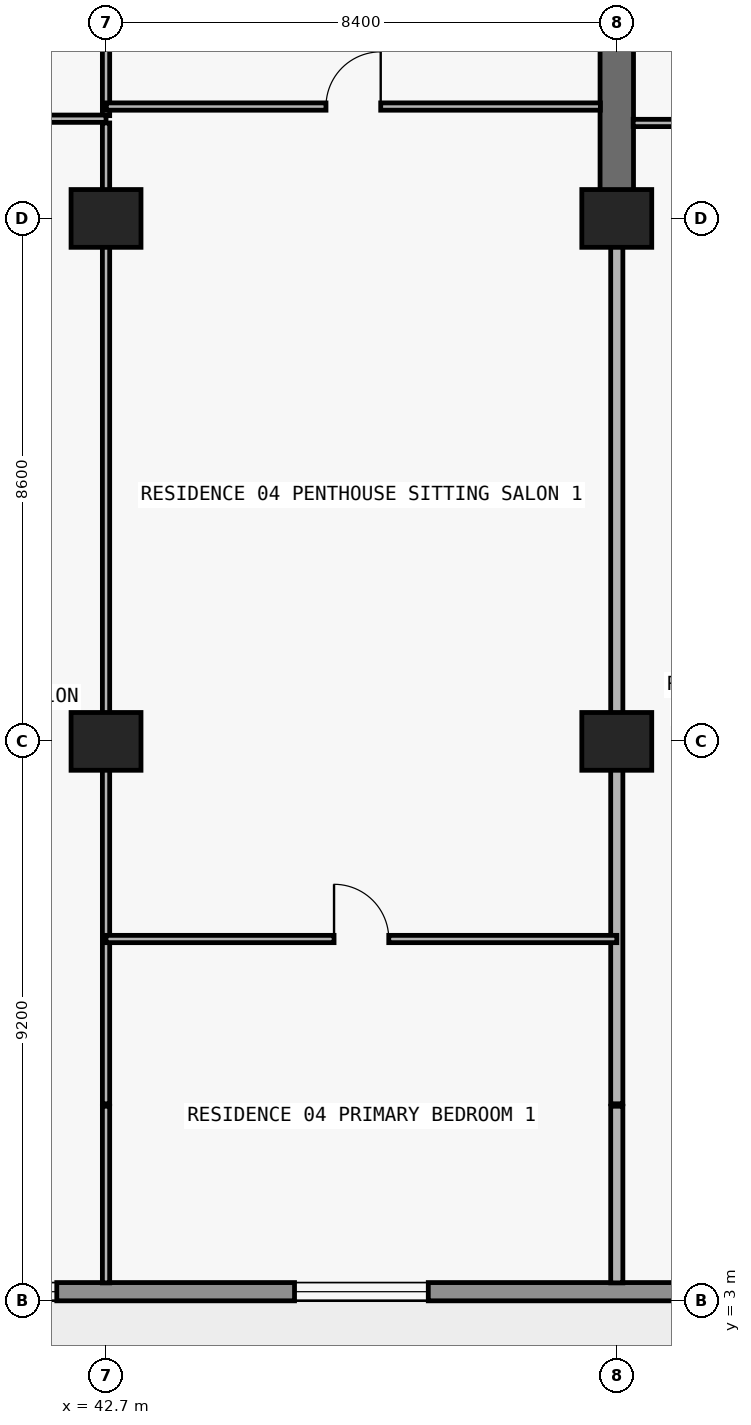
"""IFC4 building model, lengths in metres.
Left out: names, types, materials, properties, quantities, classifications, styles, units other than length and angle.
Written with IfcOpenShell. Run it as: python <this file> out.ifc"""

import sys

from ifc_helpers import new_model, si_unit, direction, frame, frame_2d, origin, origin_2d, place, context, subcontext, project, spatial, rectangle, extrude, element, fill, save


model = new_model("IFC4")
c1 = context("Model", 3, precision=1e-05, world=origin(), true_north=direction((0.0, 1.0)))
c2 = subcontext(c1, "Body", "Model", "MODEL_VIEW")
j1 = project(units=[si_unit("LENGTHUNIT", "METRE"), si_unit("PLANEANGLEUNIT", "RADIAN")], contexts=[c1])
p1 = place(None, origin())
s1 = spatial("IfcSite", under=j1, at=p1, CompositionType="ELEMENT")
p2 = place(p1, origin())
s2 = spatial("IfcBuilding", under=s1, at=p2, CompositionType="ELEMENT")
p3 = place(p2, frame((0.0, 0.0, 30.0)))
s3 = spatial("IfcBuildingStorey", under=s2, at=p3, CompositionType="ELEMENT", Elevation=30.0)
for number, where, z_axis, x_axis in (
    (1, (42.7, 12.2, 0.0), (0.0, 0.0, 1.0), (1.0, 0.0, 0.0)),
    (2, (51.1, 12.2, 0.0), (0.0, 0.0, 1.0), (1.0, 0.0, 0.0)),
    (3, (42.7, 20.8, 0.0), (0.0, 0.0, 1.0), (1.0, 0.0, 0.0)),
    (4, (51.1, 20.8, 0.0), (0.0, 0.0, 1.0), (1.0, 0.0, 0.0)),
):
    element("IfcColumn", number, at=place(p3, frame(where, z_axis=z_axis, x_axis=x_axis)), inside=s3, PredefinedType="COLUMN", context=c2, shape_type="SweptSolid", body=[
        extrude(rectangle(XDim=1.15, YDim=0.95, at=origin_2d()), origin(), (0.0, 0.0, 1.0), 3.05),
    ])
p4 = place(p3, frame((51.1, 20.8, 0.0), z_axis=(0.0, 0.0, 1.0), x_axis=(0.0, 1.0, 0.0)))
e5 = element("IfcWall", 5, at=p4, inside=s3, PredefinedType="SHEAR", context=c2, shape_type="SweptSolid", body=[
    extrude(rectangle(XDim=8.6, YDim=0.55, at=frame_2d((4.3, 0.0))), origin(), (0.0, 0.0, 1.0), 3.05),
])
p5 = place(p3, frame((72.7, 3.15, 0.0), z_axis=(0.0, 0.0, 1.0), x_axis=(-1.0, 0.0, 0.0)))
e6 = element("IfcWall", 6, at=p5, inside=s3, PredefinedType="STANDARD", context=c2, shape_type="SweptSolid", body=[
    extrude(rectangle(XDim=67.6, YDim=0.3, at=frame_2d((33.8, 0.0))), origin(), (0.0, 0.0, 1.0), 3.05),
])
p6 = place(p5, frame((59.826, 0.0, 0.0)))
e7 = element("IfcOpeningElement", 7, at=p6, cuts=e6, PredefinedType="OPENING", context=c2, shape_type="SweptSolid", body=[
    extrude(rectangle(XDim=2.0, YDim=2.3, at=frame_2d((1.0, 1.15))), frame((0.0, 0.16, 0.0), z_axis=(0.0, -1.0, 0.0), x_axis=(1.0, 0.0, 0.0)), (0.0, 0.0, 1.0), 0.32),
])
p7 = place(p5, frame((55.526, 0.0, 0.85)))
e8 = element("IfcOpeningElement", 8, at=p7, cuts=e6, PredefinedType="OPENING", context=c2, shape_type="SweptSolid", body=[
    extrude(rectangle(XDim=2.2, YDim=1.55, at=frame_2d((1.1, 0.775))), frame((0.0, 0.16, 0.0), z_axis=(0.0, -1.0, 0.0), x_axis=(1.0, 0.0, 0.0)), (0.0, 0.0, 1.0), 0.32),
])
p8 = place(p5, frame((51.09, 0.0, 0.0)))
e9 = element("IfcOpeningElement", 9, at=p8, cuts=e6, PredefinedType="OPENING", context=c2, shape_type="SweptSolid", body=[
    extrude(rectangle(XDim=2.0, YDim=2.3, at=frame_2d((1.0, 1.15))), frame((0.0, 0.16, 0.0), z_axis=(0.0, -1.0, 0.0), x_axis=(1.0, 0.0, 0.0)), (0.0, 0.0, 1.0), 0.32),
])
p9 = place(p5, frame((46.99, 0.0, 0.85)))
e10 = element("IfcOpeningElement", 10, at=p9, cuts=e6, PredefinedType="OPENING", context=c2, shape_type="SweptSolid", body=[
    extrude(rectangle(XDim=1.8, YDim=1.55, at=frame_2d((0.9, 0.775))), frame((0.0, 0.16, 0.0), z_axis=(0.0, -1.0, 0.0), x_axis=(1.0, 0.0, 0.0)), (0.0, 0.0, 1.0), 0.32),
])
p10 = place(p5, frame((43.026, 0.0, 0.0)))
e11 = element("IfcOpeningElement", 11, at=p10, cuts=e6, PredefinedType="OPENING", context=c2, shape_type="SweptSolid", body=[
    extrude(rectangle(XDim=2.0, YDim=2.3, at=frame_2d((1.0, 1.15))), frame((0.0, 0.16, 0.0), z_axis=(0.0, -1.0, 0.0), x_axis=(1.0, 0.0, 0.0)), (0.0, 0.0, 1.0), 0.32),
])
p11 = place(p5, frame((38.726, 0.0, 0.85)))
e12 = element("IfcOpeningElement", 12, at=p11, cuts=e6, PredefinedType="OPENING", context=c2, shape_type="SweptSolid", body=[
    extrude(rectangle(XDim=2.2, YDim=1.55, at=frame_2d((1.1, 0.775))), frame((0.0, 0.16, 0.0), z_axis=(0.0, -1.0, 0.0), x_axis=(1.0, 0.0, 0.0)), (0.0, 0.0, 1.0), 0.32),
])
p12 = place(p5, frame((34.69, 0.0, 0.0)))
e13 = element("IfcOpeningElement", 13, at=p12, cuts=e6, PredefinedType="OPENING", context=c2, shape_type="SweptSolid", body=[
    extrude(rectangle(XDim=2.0, YDim=2.3, at=frame_2d((1.0, 1.15))), frame((0.0, 0.16, 0.0), z_axis=(0.0, -1.0, 0.0), x_axis=(1.0, 0.0, 0.0)), (0.0, 0.0, 1.0), 0.32),
])
p13 = place(p5, frame((30.81, 0.0, 0.65)))
e14 = element("IfcOpeningElement", 14, at=p13, cuts=e6, PredefinedType="OPENING", context=c2, shape_type="SweptSolid", body=[
    extrude(rectangle(XDim=2.6, YDim=1.85, at=frame_2d((1.3, 0.925))), frame((0.0, 0.16, 0.0), z_axis=(0.0, -1.0, 0.0), x_axis=(1.0, 0.0, 0.0)), (0.0, 0.0, 1.0), 0.32),
])
p14 = place(p5, frame((24.7, 0.0, 0.85)))
e15 = element("IfcOpeningElement", 15, at=p14, cuts=e6, PredefinedType="OPENING", context=c2, shape_type="SweptSolid", body=[
    extrude(rectangle(XDim=2.2, YDim=1.55, at=frame_2d((1.1, 0.775))), frame((0.0, 0.16, 0.0), z_axis=(0.0, -1.0, 0.0), x_axis=(1.0, 0.0, 0.0)), (0.0, 0.0, 1.0), 0.32),
])
p15 = place(p5, frame((18.626, 0.0, 0.0)))
e16 = element("IfcOpeningElement", 16, at=p15, cuts=e6, PredefinedType="OPENING", context=c2, shape_type="SweptSolid", body=[
    extrude(rectangle(XDim=2.0, YDim=2.3, at=frame_2d((1.0, 1.15))), frame((0.0, 0.16, 0.0), z_axis=(0.0, -1.0, 0.0), x_axis=(1.0, 0.0, 0.0)), (0.0, 0.0, 1.0), 0.32),
])
p16 = place(p5, frame((14.326, 0.0, 0.85)))
e17 = element("IfcOpeningElement", 17, at=p16, cuts=e6, PredefinedType="OPENING", context=c2, shape_type="SweptSolid", body=[
    extrude(rectangle(XDim=2.2, YDim=1.55, at=frame_2d((1.1, 0.775))), frame((0.0, 0.16, 0.0), z_axis=(0.0, -1.0, 0.0), x_axis=(1.0, 0.0, 0.0)), (0.0, 0.0, 1.0), 0.32),
])
p17 = place(p5, frame((9.89, 0.0, 0.0)))
e18 = element("IfcOpeningElement", 18, at=p17, cuts=e6, PredefinedType="OPENING", context=c2, shape_type="SweptSolid", body=[
    extrude(rectangle(XDim=2.0, YDim=2.3, at=frame_2d((1.0, 1.15))), frame((0.0, 0.16, 0.0), z_axis=(0.0, -1.0, 0.0), x_axis=(1.0, 0.0, 0.0)), (0.0, 0.0, 1.0), 0.32),
])
p18 = place(p5, frame((5.79, 0.0, 0.85)))
e19 = element("IfcOpeningElement", 19, at=p18, cuts=e6, PredefinedType="OPENING", context=c2, shape_type="SweptSolid", body=[
    extrude(rectangle(XDim=1.8, YDim=1.55, at=frame_2d((0.9, 0.775))), frame((0.0, 0.16, 0.0), z_axis=(0.0, -1.0, 0.0), x_axis=(1.0, 0.0, 0.0)), (0.0, 0.0, 1.0), 0.32),
])
p19 = place(p3, frame((42.7, 3.295, 0.0), z_axis=(0.0, 0.0, 1.0), x_axis=(0.0, 1.0, 0.0)))
e20 = element("IfcWall", 20, at=p19, inside=s3, PredefinedType="PARTITIONING", context=c2, shape_type="SweptSolid", body=[
    extrude(rectangle(XDim=2.905, YDim=0.12, at=frame_2d((1.453, 0.0))), origin(), (0.0, 0.0, 1.0), 3.05),
])
p20 = place(p3, frame((42.7, 6.24, 0.0), z_axis=(0.0, 0.0, 1.0), x_axis=(0.0, 1.0, 0.0)))
e21 = element("IfcWall", 21, at=p20, inside=s3, PredefinedType="PARTITIONING", context=c2, shape_type="SweptSolid", body=[
    extrude(rectangle(XDim=16.13, YDim=0.12, at=frame_2d((8.065, 0.0))), origin(), (0.0, 0.0, 1.0), 2.11),
])
p21 = place(p3, frame((42.7, 22.49, 0.0), z_axis=(0.0, 0.0, 1.0), x_axis=(0.0, 1.0, 0.0)))
e22 = element("IfcWall", 22, at=p21, inside=s3, PredefinedType="PARTITIONING", context=c2, shape_type="SweptSolid", body=[
    extrude(rectangle(XDim=4.69, YDim=0.12, at=frame_2d((2.345, 0.0))), origin(), (0.0, 0.0, 1.0), 2.11),
])
p22 = place(p21, frame((1.9, 0.0, 0.0)))
e23 = element("IfcOpeningElement", 23, at=p22, cuts=e22, PredefinedType="OPENING", context=c2, shape_type="SweptSolid", body=[
    extrude(rectangle(XDim=0.9, YDim=2.06, at=frame_2d((0.45, 1.03))), frame((0.0, 0.07, 0.0), z_axis=(0.0, -1.0, 0.0), x_axis=(1.0, 0.0, 0.0)), (0.0, 0.0, 1.0), 0.14),
])
p23 = place(p3, frame((51.1, 3.295, 0.0), z_axis=(0.0, 0.0, 1.0), x_axis=(0.0, 1.0, 0.0)))
e24 = element("IfcWall", 24, at=p23, inside=s3, PredefinedType="PARTITIONING", context=c2, shape_type="SweptSolid", body=[
    extrude(rectangle(XDim=2.905, YDim=0.2, at=frame_2d((1.453, 0.0))), origin(), (0.0, 0.0, 1.0), 3.05),
])
p24 = place(p3, frame((51.1, 6.24, 0.0), z_axis=(0.0, 0.0, 1.0), x_axis=(0.0, 1.0, 0.0)))
e25 = element("IfcWall", 25, at=p24, inside=s3, PredefinedType="PARTITIONING", context=c2, shape_type="SweptSolid", body=[
    extrude(rectangle(XDim=14.555, YDim=0.2, at=frame_2d((7.277, 0.0))), origin(), (0.0, 0.0, 1.0), 2.11),
])
p25 = place(p3, frame((42.7, 8.95, 0.0), z_axis=(0.0, 0.0, 1.0), x_axis=(1.0, 0.0, 0.0)))
e26 = element("IfcWall", 26, at=p25, inside=s3, PredefinedType="PARTITIONING", context=c2, shape_type="SweptSolid", body=[
    extrude(rectangle(XDim=8.4, YDim=0.12, at=frame_2d((4.2, 0.0))), origin(), (0.0, 0.0, 1.0), 3.05),
])
p26 = place(p25, frame((3.75, 0.0, 0.0)))
e27 = element("IfcOpeningElement", 27, at=p26, cuts=e26, PredefinedType="OPENING", context=c2, shape_type="SweptSolid", body=[
    extrude(rectangle(XDim=0.9, YDim=2.15, at=frame_2d((0.45, 1.075))), frame((0.0, 0.07, 0.0), z_axis=(0.0, -1.0, 0.0), x_axis=(1.0, 0.0, 0.0)), (0.0, 0.0, 1.0), 0.14),
])
p27 = place(p3, frame((51.37, 22.37, 0.0), z_axis=(0.0, 0.0, 1.0), x_axis=(1.0, 0.0, 0.0)))
e28 = element("IfcWall", 28, at=p27, inside=s3, PredefinedType="PARTITIONING", context=c2, shape_type="SweptSolid", body=[
    extrude(rectangle(XDim=4.516, YDim=0.12, at=frame_2d((2.258, 0.0))), origin(), (0.0, 0.0, 1.0), 3.05),
])
p28 = place(p27, frame((1.389, 0.0, 0.0)))
e29 = element("IfcOpeningElement", 29, at=p28, cuts=e28, PredefinedType="OPENING", context=c2, shape_type="SweptSolid", body=[
    extrude(rectangle(XDim=0.9, YDim=2.15, at=frame_2d((0.45, 1.075))), frame((0.0, 0.07, 0.0), z_axis=(0.0, -1.0, 0.0), x_axis=(1.0, 0.0, 0.0)), (0.0, 0.0, 1.0), 0.14),
])
p29 = place(p3, frame((35.1, 22.44, 0.0), z_axis=(0.0, 0.0, 1.0), x_axis=(1.0, 0.0, 0.0)))
e30 = element("IfcWall", 30, at=p29, inside=s3, PredefinedType="PARTITIONING", context=c2, shape_type="SweptSolid", body=[
    extrude(rectangle(XDim=7.6, YDim=0.12, at=frame_2d((3.8, 0.0))), origin(), (0.0, 0.0, 1.0), 3.05),
])
p30 = place(p29, frame((3.35, 0.0, 0.0)))
e31 = element("IfcOpeningElement", 31, at=p30, cuts=e30, PredefinedType="OPENING", context=c2, shape_type="SweptSolid", body=[
    extrude(rectangle(XDim=0.9, YDim=2.15, at=frame_2d((0.45, 1.075))), frame((0.0, 0.07, 0.0), z_axis=(0.0, -1.0, 0.0), x_axis=(1.0, 0.0, 0.0)), (0.0, 0.0, 1.0), 0.14),
])
p31 = place(p3, frame((42.705, 22.64, 0.0), z_axis=(0.0, 0.0, 1.0), x_axis=(1.0, 0.0, 0.0)))
e32 = element("IfcWall", 32, at=p31, inside=s3, PredefinedType="PARTITIONING", context=c2, shape_type="SweptSolid", body=[
    extrude(rectangle(XDim=8.125, YDim=0.12, at=frame_2d((4.062, 0.0))), origin(), (0.0, 0.0, 1.0), 3.05),
])
p32 = place(p31, frame((3.613, 0.0, 0.0)))
e33 = element("IfcOpeningElement", 33, at=p32, cuts=e32, PredefinedType="OPENING", context=c2, shape_type="SweptSolid", body=[
    extrude(rectangle(XDim=0.9, YDim=2.15, at=frame_2d((0.45, 1.075))), frame((0.0, 0.07, 0.0), z_axis=(0.0, -1.0, 0.0), x_axis=(1.0, 0.0, 0.0)), (0.0, 0.0, 1.0), 0.14),
])
p33 = place(p13, origin())
e34 = element("IfcWindow", 34, at=p33, inside=s3, PartitioningType="SINGLE_PANEL", PredefinedType="WINDOW", context=c2, shape_type="SweptSolid", body=[
    extrude(rectangle(XDim=2.6, YDim=1.85, at=frame_2d((1.3, 0.925))), frame((0.0, 0.03, 0.0), z_axis=(0.0, -1.0, 0.0), x_axis=(1.0, 0.0, 0.0)), (0.0, 0.0, 1.0), 0.06),
])
fill(e14, e34)
p34 = place(p14, origin())
e35 = element("IfcWindow", 35, at=p34, inside=s3, PartitioningType="SINGLE_PANEL", PredefinedType="WINDOW", context=c2, shape_type="SweptSolid", body=[
    extrude(rectangle(XDim=2.2, YDim=1.55, at=frame_2d((1.1, 0.775))), frame((0.0, 0.03, 0.0), z_axis=(0.0, -1.0, 0.0), x_axis=(1.0, 0.0, 0.0)), (0.0, 0.0, 1.0), 0.06),
])
fill(e15, e35)
p35 = place(p32, origin())
e36 = element("IfcDoor", 36, at=p35, inside=s3, OperationType="SINGLE_SWING_RIGHT", PredefinedType="DOOR", context=c2, shape_type="SweptSolid", body=[
    extrude(rectangle(XDim=0.9, YDim=2.15, at=frame_2d((0.45, 1.075))), frame((0.0, 0.025, 0.0), z_axis=(0.0, -1.0, 0.0), x_axis=(1.0, 0.0, 0.0)), (0.0, 0.0, 1.0), 0.05),
])
fill(e33, e36)
p36 = place(p26, origin())
e37 = element("IfcDoor", 37, at=p36, inside=s3, OperationType="SINGLE_SWING_LEFT", PredefinedType="DOOR", context=c2, shape_type="SweptSolid", body=[
    extrude(rectangle(XDim=0.9, YDim=2.15, at=frame_2d((0.45, 1.075))), frame((0.0, 0.025, 0.0), z_axis=(0.0, -1.0, 0.0), x_axis=(1.0, 0.0, 0.0)), (0.0, 0.0, 1.0), 0.05),
])
fill(e27, e37)
save(model, sys.argv[1])
